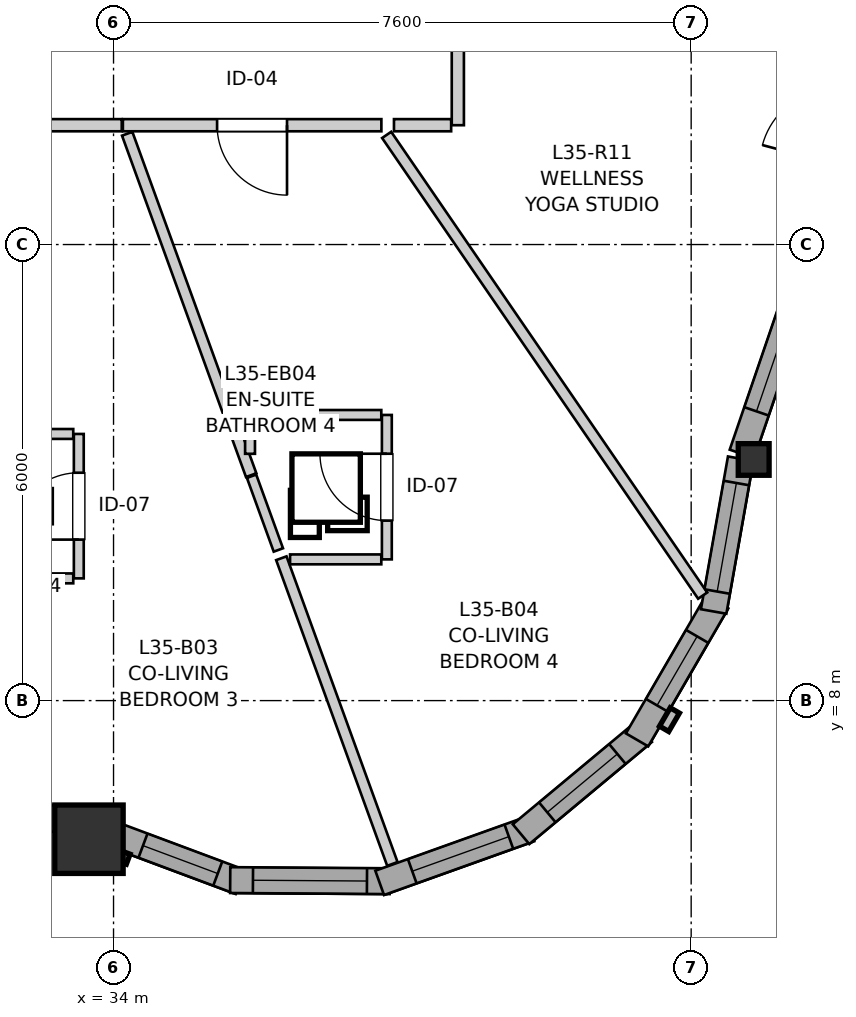
"""IFC4 building model, lengths in metres.
Left out: names, types, materials, properties, quantities, classifications, styles, units other than length and angle.
Written with IfcOpenShell. Run it as: python <this file> out.ifc"""

import sys

from ifc_helpers import new_model, si_unit, direction, frame, frame_2d, origin, origin_2d, place, context, subcontext, project, spatial, rectangle, i_section, extrude, source, transform, mapped, element, fill, save


model = new_model("IFC4")
c1 = context("Model", 3, precision=1e-05, world=origin(), true_north=direction((0.0, 1.0)))
c2 = subcontext(c1, "Body", "Model", "MODEL_VIEW")
j1 = project(units=[si_unit("LENGTHUNIT", "METRE"), si_unit("PLANEANGLEUNIT", "RADIAN")], contexts=[c1])
p1 = place(None, origin())
s1 = spatial("IfcSite", under=j1, at=p1, CompositionType="ELEMENT")
p2 = place(p1, origin())
s2 = spatial("IfcBuilding", under=s1, at=p2, CompositionType="ELEMENT")
p3 = place(p2, frame((0.0, 0.0, 118.4)))
s3 = spatial("IfcBuildingStorey", under=s2, at=p3, CompositionType="ELEMENT", Elevation=118.4)
m1 = source(origin(), c2, "Body", "SweptSolid", [
    extrude(rectangle(XDim=0.9, YDim=0.9, at=origin_2d()), origin(), (0.0, 0.0, 1.0), 2.95),
])
p4 = place(p3, frame((33.677, 6.176, 0.0), z_axis=(0.0, 0.0, 1.0), x_axis=(1.0, 0.0, 0.0)))
e1 = element("IfcColumn", 1, at=p4, inside=s3, PredefinedType="COLUMN", context=c2, shape_type="MappedRepresentation", body=[
    mapped(m1, transform((0.0, 0.0, 0.0), x_axis=(1.0, 0.0, 0.0), y_axis=(0.0, 1.0, 0.0), z_axis=(0.0, 0.0, 1.0), scale=1.0)),
])
m2 = source(origin(), c2, "Body", "SweptSolid", [
    extrude(i_section(OverallWidth=0.406, OverallDepth=0.416, WebThickness=0.027, FlangeThickness=0.044, FilletRadius=0.015, at=origin_2d()), origin(), (0.0, 0.0, 1.0), 2.95),
])
p5 = place(p3, frame((42.423, 11.172, 0.0), z_axis=(0.0, 0.0, 1.0), x_axis=(1.0, 0.0, 0.0)))
e2 = element("IfcColumn", 2, at=p5, inside=s3, PredefinedType="PILASTER", context=c2, shape_type="MappedRepresentation", body=[
    mapped(m2, transform((0.0, 0.0, 0.0), x_axis=(1.0, 0.0, 0.0), y_axis=(0.0, 1.0, 0.0), z_axis=(0.0, 0.0, 1.0), scale=1.0)),
])
p6 = place(p3, frame((30.652, 6.973, 0.0), z_axis=(0.0, 0.0, 1.0), x_axis=(0.979418300652, -0.201841007595, 0.0)))
e3 = element("IfcWall", 3, at=p6, inside=s3, PredefinedType="SOLIDWALL", context=c2, shape_type="SweptSolid", body=[
    extrude(rectangle(XDim=2.893, YDim=0.34, at=frame_2d((1.447, 0.0))), origin(), (0.0, 0.0, 1.0), 2.48),
])
p7 = place(p6, frame((0.383, 0.0, 0.82)))
e4 = element("IfcOpeningElement", 4, at=p7, cuts=e3, PredefinedType="OPENING", context=c2, shape_type="SweptSolid", body=[
    extrude(rectangle(XDim=0.58, YDim=1.35, at=frame_2d((0.29, 0.675))), frame((0.0, 0.18, 0.0), z_axis=(0.0, -1.0, 0.0), x_axis=(1.0, 0.0, 0.0)), (0.0, 0.0, 1.0), 0.36),
])
p8 = place(p6, frame((1.31, 0.0, 0.82)))
e5 = element("IfcOpeningElement", 5, at=p8, cuts=e3, PredefinedType="OPENING", context=c2, shape_type="SweptSolid", body=[
    extrude(rectangle(XDim=1.15, YDim=1.2, at=frame_2d((0.575, 0.6))), frame((0.0, 0.18, 0.0), z_axis=(0.0, -1.0, 0.0), x_axis=(1.0, 0.0, 0.0)), (0.0, 0.0, 1.0), 0.36),
])
p9 = place(p3, frame((33.952, 6.255, 0.0), z_axis=(0.0, 0.0, 1.0), x_axis=(0.936799566991, -0.349866504951, 0.0)))
e6 = element("IfcWall", 6, at=p9, inside=s3, PredefinedType="SOLIDWALL", context=c2, shape_type="SweptSolid", body=[
    extrude(rectangle(XDim=1.831, YDim=0.34, at=frame_2d((0.916, 0.0))), origin(), (0.0, 0.0, 1.0), 2.48),
])
p10 = place(p9, frame((0.466, 0.0, 0.82)))
e7 = element("IfcOpeningElement", 7, at=p10, cuts=e6, PredefinedType="OPENING", context=c2, shape_type="SweptSolid", body=[
    extrude(rectangle(XDim=1.05, YDim=1.45, at=frame_2d((0.525, 0.725))), frame((0.0, 0.18, 0.0), z_axis=(0.0, -1.0, 0.0), x_axis=(1.0, 0.0, 0.0)), (0.0, 0.0, 1.0), 0.36),
])
p11 = place(p3, frame((35.535, 5.639, 0.0), z_axis=(0.0, 0.0, 1.0), x_axis=(0.999976456891, -0.00686189939, 0.0)))
e8 = element("IfcWall", 8, at=p11, inside=s3, PredefinedType="SOLIDWALL", context=c2, shape_type="SweptSolid", body=[
    extrude(rectangle(XDim=2.099, YDim=0.34, at=frame_2d((1.05, 0.0))), origin(), (0.0, 0.0, 1.0), 2.48),
])
p12 = place(p11, frame((0.3, 0.0, 0.82)))
e9 = element("IfcOpeningElement", 9, at=p12, cuts=e8, PredefinedType="OPENING", context=c2, shape_type="SweptSolid", body=[
    extrude(rectangle(XDim=1.5, YDim=1.45, at=frame_2d((0.75, 0.725))), frame((0.0, 0.18, 0.0), z_axis=(0.0, -1.0, 0.0), x_axis=(1.0, 0.0, 0.0)), (0.0, 0.0, 1.0), 0.36),
])
p13 = place(p3, frame((37.502, 5.602, 0.0), z_axis=(0.0, 0.0, 1.0), x_axis=(0.941523304278, 0.336947870598, 0.0)))
e10 = element("IfcWall", 10, at=p13, inside=s3, PredefinedType="SOLIDWALL", context=c2, shape_type="SweptSolid", body=[
    extrude(rectangle(XDim=2.099, YDim=0.34, at=frame_2d((1.05, 0.0))), origin(), (0.0, 0.0, 1.0), 2.48),
])
p14 = place(p13, frame((0.455, 0.0, 0.82)))
e11 = element("IfcOpeningElement", 11, at=p14, cuts=e10, PredefinedType="OPENING", context=c2, shape_type="SweptSolid", body=[
    extrude(rectangle(XDim=1.35, YDim=1.45, at=frame_2d((0.675, 0.725))), frame((0.0, 0.18, 0.0), z_axis=(0.0, -1.0, 0.0), x_axis=(1.0, 0.0, 0.0)), (0.0, 0.0, 1.0), 0.36),
])
p15 = place(p3, frame((39.362, 6.242, 0.0), z_axis=(0.0, 0.0, 1.0), x_axis=(0.768440501876, 0.639921241308, 0.0)))
e12 = element("IfcWall", 12, at=p15, inside=s3, PredefinedType="SOLIDWALL", context=c2, shape_type="SweptSolid", body=[
    extrude(rectangle(XDim=2.099, YDim=0.34, at=frame_2d((1.05, 0.0))), origin(), (0.0, 0.0, 1.0), 2.48),
])
p16 = place(p15, frame((0.449, 0.0, 0.82)))
e13 = element("IfcOpeningElement", 13, at=p16, cuts=e12, PredefinedType="OPENING", context=c2, shape_type="SweptSolid", body=[
    extrude(rectangle(XDim=1.2, YDim=1.45, at=frame_2d((0.6, 0.725))), frame((0.0, 0.18, 0.0), z_axis=(0.0, -1.0, 0.0), x_axis=(1.0, 0.0, 0.0)), (0.0, 0.0, 1.0), 0.36),
])
p17 = place(p3, frame((40.888, 7.483, 0.0), z_axis=(0.0, 0.0, 1.0), x_axis=(0.501902596059, 0.864924149315, 0.0)))
e14 = element("IfcWall", 14, at=p17, inside=s3, PredefinedType="SOLIDWALL", context=c2, shape_type="SweptSolid", body=[
    extrude(rectangle(XDim=2.099, YDim=0.34, at=frame_2d((1.049, 0.0))), origin(), (0.0, 0.0, 1.0), 2.48),
])
p18 = place(p17, frame((0.524, 0.0, 0.82)))
e15 = element("IfcOpeningElement", 15, at=p18, cuts=e14, PredefinedType="OPENING", context=c2, shape_type="SweptSolid", body=[
    extrude(rectangle(XDim=1.05, YDim=1.45, at=frame_2d((0.525, 0.725))), frame((0.0, 0.18, 0.0), z_axis=(0.0, -1.0, 0.0), x_axis=(1.0, 0.0, 0.0)), (0.0, 0.0, 1.0), 0.36),
])
p19 = place(p3, frame((41.896, 9.173, 0.0), z_axis=(0.0, 0.0, 1.0), x_axis=(0.174399433509, 0.984674990843, 0.0)))
e16 = element("IfcWall", 16, at=p19, inside=s3, PredefinedType="SOLIDWALL", context=c2, shape_type="SweptSolid", body=[
    extrude(rectangle(XDim=2.041, YDim=0.34, at=frame_2d((1.021, 0.0))), origin(), (0.0, 0.0, 1.0), 2.48),
])
p20 = place(p19, frame((0.267, 0.0, 0.82)))
e17 = element("IfcOpeningElement", 17, at=p20, cuts=e16, PredefinedType="OPENING", context=c2, shape_type="SweptSolid", body=[
    extrude(rectangle(XDim=1.45, YDim=1.25, at=frame_2d((0.725, 0.625))), frame((0.0, 0.18, 0.0), z_axis=(0.0, -1.0, 0.0), x_axis=(1.0, 0.0, 0.0)), (0.0, 0.0, 1.0), 0.36),
])
p21 = place(p3, frame((42.268, 11.246, 0.0), z_axis=(0.0, 0.0, 1.0), x_axis=(0.323583674973, 0.946199558915, 0.0)))
e18 = element("IfcWall", 18, at=p21, inside=s3, PredefinedType="SOLIDWALL", context=c2, shape_type="SweptSolid", body=[
    extrude(rectangle(XDim=3.152, YDim=0.34, at=frame_2d((1.576, 0.0))), origin(), (0.0, 0.0, 1.0), 2.48),
])
p22 = place(p21, frame((0.591, 0.0, 0.82)))
e19 = element("IfcOpeningElement", 19, at=p22, cuts=e18, PredefinedType="OPENING", context=c2, shape_type="SweptSolid", body=[
    extrude(rectangle(XDim=1.95, YDim=1.4, at=frame_2d((0.975, 0.7))), frame((0.0, 0.18, 0.0), z_axis=(0.0, -1.0, 0.0), x_axis=(1.0, 0.0, 0.0)), (0.0, 0.0, 1.0), 0.36),
])
p23 = place(p3, frame((38.53, 21.321, 0.0), z_axis=(0.0, 0.0, 1.0), x_axis=(0.0, -1.0, 0.0)))
e20 = element("IfcWall", 20, at=p23, inside=s3, PredefinedType="PARTITIONING", context=c2, shape_type="SweptSolid", body=[
    extrude(rectangle(XDim=5.751, YDim=0.16, at=frame_2d((2.875, 0.0))), origin(), (0.0, 0.0, 1.0), 2.95),
])
p24 = place(p23, frame((2.404, 0.0, 0.0)))
e21 = element("IfcOpeningElement", 21, at=p24, cuts=e20, PredefinedType="OPENING", context=c2, shape_type="SweptSolid", body=[
    extrude(rectangle(XDim=0.96, YDim=2.1, at=frame_2d((0.48, 1.05))), frame((0.0, 0.09, 0.0), z_axis=(0.0, -1.0, 0.0), x_axis=(1.0, 0.0, 0.0)), (0.0, 0.0, 1.0), 0.18),
])
p25 = place(p3, frame((37.524, 15.57, 0.0), z_axis=(0.0, 0.0, 1.0), x_axis=(-1.0, 0.0, 0.0)))
e22 = element("IfcWall", 22, at=p25, inside=s3, PredefinedType="PARTITIONING", context=c2, shape_type="SweptSolid", body=[
    extrude(rectangle(XDim=3.401, YDim=0.16, at=frame_2d((1.7, 0.0))), origin(), (0.0, 0.0, 1.0), 2.95),
])
p26 = place(p25, frame((1.241, 0.0, 0.0)))
e23 = element("IfcOpeningElement", 23, at=p26, cuts=e22, PredefinedType="OPENING", context=c2, shape_type="SweptSolid", body=[
    extrude(rectangle(XDim=0.92, YDim=2.1, at=frame_2d((0.46, 1.05))), frame((0.0, 0.09, 0.0), z_axis=(0.0, -1.0, 0.0), x_axis=(1.0, 0.0, 0.0)), (0.0, 0.0, 1.0), 0.18),
])
p27 = place(p3, frame((34.108, 15.57, 0.0), z_axis=(0.0, 0.0, 1.0), x_axis=(-1.0, 0.0, 0.0)))
e24 = element("IfcWall", 24, at=p27, inside=s3, PredefinedType="PARTITIONING", context=c2, shape_type="SweptSolid", body=[
    extrude(rectangle(XDim=2.869, YDim=0.16, at=frame_2d((1.435, 0.0))), origin(), (0.0, 0.0, 1.0), 2.95),
])
p28 = place(p27, frame((0.974, 0.0, 0.0)))
e25 = element("IfcOpeningElement", 25, at=p28, cuts=e24, PredefinedType="OPENING", context=c2, shape_type="SweptSolid", body=[
    extrude(rectangle(XDim=0.92, YDim=2.1, at=frame_2d((0.46, 1.05))), frame((0.0, 0.09, 0.0), z_axis=(0.0, -1.0, 0.0), x_axis=(1.0, 0.0, 0.0)), (0.0, 0.0, 1.0), 0.18),
])
p29 = place(p3, frame((33.543, 9.608, 0.0), z_axis=(0.0, 0.0, 1.0), x_axis=(0.0, 1.0, 0.0)))
e26 = element("IfcWall", 26, at=p29, inside=s3, PredefinedType="PARTITIONING", context=c2, shape_type="SweptSolid", body=[
    extrude(rectangle(XDim=1.9, YDim=0.13, at=frame_2d((0.95, 0.0))), origin(), (0.0, 0.0, 1.0), 2.95),
])
p30 = place(p29, frame((0.51, 0.0, 0.0)))
e27 = element("IfcOpeningElement", 27, at=p30, cuts=e26, PredefinedType="OPENING", context=c2, shape_type="SweptSolid", body=[
    extrude(rectangle(XDim=0.88, YDim=2.05, at=frame_2d((0.44, 1.025))), frame((0.0, 0.075, 0.0), z_axis=(0.0, -1.0, 0.0), x_axis=(1.0, 0.0, 0.0)), (0.0, 0.0, 1.0), 0.15),
])
p31 = place(p3, frame((37.596, 9.858, 0.0), z_axis=(0.0, 0.0, 1.0), x_axis=(0.0, 1.0, 0.0)))
e28 = element("IfcWall", 28, at=p31, inside=s3, PredefinedType="PARTITIONING", context=c2, shape_type="SweptSolid", body=[
    extrude(rectangle(XDim=1.9, YDim=0.13, at=frame_2d((0.95, 0.0))), origin(), (0.0, 0.0, 1.0), 2.95),
])
p32 = place(p31, frame((0.51, 0.0, 0.0)))
e29 = element("IfcOpeningElement", 29, at=p32, cuts=e28, PredefinedType="OPENING", context=c2, shape_type="SweptSolid", body=[
    extrude(rectangle(XDim=0.88, YDim=2.05, at=frame_2d((0.44, 1.025))), frame((0.0, 0.075, 0.0), z_axis=(0.0, -1.0, 0.0), x_axis=(1.0, 0.0, 0.0)), (0.0, 0.0, 1.0), 0.15),
])
p33 = place(p3, frame((37.594, 15.442, 0.0), z_axis=(0.0, 0.0, 1.0), x_axis=(0.565681325722, -0.824623937155, 0.0)))
e30 = element("IfcWall", 30, at=p33, inside=s3, PredefinedType="PARTITIONING", context=c2, shape_type="SweptSolid", body=[
    extrude(rectangle(XDim=7.35, YDim=0.145, at=frame_2d((3.675, 0.0))), origin(), (0.0, 0.0, 1.0), 2.95),
])
p34 = place(p3, frame((34.18, 15.458, 0.0), z_axis=(0.0, 0.0, 1.0), x_axis=(0.341373856507, -0.939927598325, 0.0)))
e31 = element("IfcWall", 31, at=p34, inside=s3, PredefinedType="PARTITIONING", context=c2, shape_type="SweptSolid", body=[
    extrude(rectangle(XDim=4.779, YDim=0.145, at=frame_2d((2.389, 0.0))), origin(), (0.0, 0.0, 1.0), 2.95),
])
p35 = place(p3, frame((36.208, 9.873, 0.0), z_axis=(0.0, 0.0, 1.0), x_axis=(0.341362804218, -0.939931612351, 0.0)))
e32 = element("IfcWall", 32, at=p35, inside=s3, PredefinedType="PARTITIONING", context=c2, shape_type="SweptSolid", body=[
    extrude(rectangle(XDim=4.279, YDim=0.145, at=frame_2d((2.14, 0.0))), origin(), (0.0, 0.0, 1.0), 2.95),
])
p36 = place(p3, frame((31.743, 11.508, 0.0), z_axis=(0.0, 0.0, 1.0), x_axis=(1.0, 0.0, 0.0)))
e33 = element("IfcWall", 33, at=p36, inside=s3, PredefinedType="PARTITIONING", context=c2, shape_type="SweptSolid", body=[
    extrude(rectangle(XDim=1.727, YDim=0.13, at=frame_2d((0.864, 0.0))), origin(), (0.0, 0.0, 1.0), 2.95),
])
p37 = place(p3, frame((31.829, 9.608, 0.0), z_axis=(0.0, 0.0, 1.0), x_axis=(1.0, 0.0, 0.0)))
e34 = element("IfcWall", 34, at=p37, inside=s3, PredefinedType="PARTITIONING", context=c2, shape_type="SweptSolid", body=[
    extrude(rectangle(XDim=1.641, YDim=0.13, at=frame_2d((0.82, 0.0))), origin(), (0.0, 0.0, 1.0), 2.558),
])
p38 = place(p3, frame((35.796, 11.758, 0.0), z_axis=(0.0, 0.0, 1.0), x_axis=(1.0, 0.0, 0.0)))
e35 = element("IfcWall", 35, at=p38, inside=s3, PredefinedType="PARTITIONING", context=c2, shape_type="SweptSolid", body=[
    extrude(rectangle(XDim=1.727, YDim=0.13, at=frame_2d((0.864, 0.0))), origin(), (0.0, 0.0, 1.0), 2.95),
])
p39 = place(p3, frame((36.323, 9.858, 0.0), z_axis=(0.0, 0.0, 1.0), x_axis=(1.0, 0.0, 0.0)))
e36 = element("IfcWall", 36, at=p39, inside=s3, PredefinedType="PARTITIONING", context=c2, shape_type="SweptSolid", body=[
    extrude(rectangle(XDim=1.2, YDim=0.13, at=frame_2d((0.6, 0.0))), origin(), (0.0, 0.0, 1.0), 2.95),
])
p40 = place(p3, frame((35.816, 10.952, 0.0), z_axis=(0.0, 0.0, 1.0), x_axis=(0.341515178303, -0.939876259403, 0.0)))
e37 = element("IfcWall", 37, at=p40, inside=s3, PredefinedType="PARTITIONING", context=c2, shape_type="SweptSolid", body=[
    extrude(rectangle(XDim=1.032, YDim=0.13, at=frame_2d((0.516, 0.0))), origin(), (0.0, 0.0, 1.0), 2.95),
])
p41 = place(p3, frame((37.69, 15.57, 0.0), z_axis=(0.0, 0.0, 1.0), x_axis=(1.0, 0.0, 0.0)))
e38 = element("IfcWall", 38, at=p41, inside=s3, PredefinedType="PARTITIONING", context=c2, shape_type="SweptSolid", body=[
    extrude(rectangle(XDim=0.752, YDim=0.16, at=frame_2d((0.376, 0.0))), origin(), (0.0, 0.0, 1.0), 2.95),
])
p42 = place(p3, frame((35.796, 11.247, 0.0), z_axis=(0.0, 0.0, 1.0), x_axis=(0.0, 1.0, 0.0)))
e39 = element("IfcWall", 39, at=p42, inside=s3, PredefinedType="PARTITIONING", context=c2, shape_type="SweptSolid", body=[
    extrude(rectangle(XDim=0.438, YDim=0.13, at=frame_2d((0.219, 0.0))), origin(), (0.0, 0.0, 1.0), 2.95),
])
m3 = source(origin(), c2, "Body", "SweptSolid", [
    extrude(rectangle(XDim=1.05, YDim=1.45, at=frame_2d((0.525, 0.725))), frame((0.0, 0.03, 0.0), z_axis=(0.0, -1.0, 0.0), x_axis=(1.0, 0.0, 0.0)), (0.0, 0.0, 1.0), 0.06),
])
p43 = place(p10, origin())
e40 = element("IfcWindow", 40, at=p43, inside=s3, PartitioningType="SINGLE_PANEL", PredefinedType="WINDOW", context=c2, shape_type="MappedRepresentation", body=[
    mapped(m3, transform((0.0, 0.0, 0.0), x_axis=(1.0, 0.0, 0.0), y_axis=(0.0, 1.0, 0.0), z_axis=(0.0, 0.0, 1.0), scale=1.0)),
])
fill(e7, e40)
m4 = source(origin(), c2, "Body", "SweptSolid", [
    extrude(rectangle(XDim=1.5, YDim=1.45, at=frame_2d((0.75, 0.725))), frame((0.0, 0.03, 0.0), z_axis=(0.0, -1.0, 0.0), x_axis=(1.0, 0.0, 0.0)), (0.0, 0.0, 1.0), 0.06),
])
p44 = place(p12, origin())
e41 = element("IfcWindow", 41, at=p44, inside=s3, PartitioningType="SINGLE_PANEL", PredefinedType="WINDOW", context=c2, shape_type="MappedRepresentation", body=[
    mapped(m4, transform((0.0, 0.0, 0.0), x_axis=(1.0, 0.0, 0.0), y_axis=(0.0, 1.0, 0.0), z_axis=(0.0, 0.0, 1.0), scale=1.0)),
])
fill(e9, e41)
m5 = source(origin(), c2, "Body", "SweptSolid", [
    extrude(rectangle(XDim=1.35, YDim=1.45, at=frame_2d((0.675, 0.725))), frame((0.0, 0.03, 0.0), z_axis=(0.0, -1.0, 0.0), x_axis=(1.0, 0.0, 0.0)), (0.0, 0.0, 1.0), 0.06),
])
p45 = place(p14, origin())
e42 = element("IfcWindow", 42, at=p45, inside=s3, PartitioningType="SINGLE_PANEL", PredefinedType="WINDOW", context=c2, shape_type="MappedRepresentation", body=[
    mapped(m5, transform((0.0, 0.0, 0.0), x_axis=(1.0, 0.0, 0.0), y_axis=(0.0, 1.0, 0.0), z_axis=(0.0, 0.0, 1.0), scale=1.0)),
])
fill(e11, e42)
m6 = source(origin(), c2, "Body", "SweptSolid", [
    extrude(rectangle(XDim=1.2, YDim=1.45, at=frame_2d((0.6, 0.725))), frame((0.0, 0.03, 0.0), z_axis=(0.0, -1.0, 0.0), x_axis=(1.0, 0.0, 0.0)), (0.0, 0.0, 1.0), 0.06),
])
p46 = place(p16, origin())
e43 = element("IfcWindow", 43, at=p46, inside=s3, PartitioningType="SINGLE_PANEL", PredefinedType="WINDOW", context=c2, shape_type="MappedRepresentation", body=[
    mapped(m6, transform((0.0, 0.0, 0.0), x_axis=(1.0, 0.0, 0.0), y_axis=(0.0, 1.0, 0.0), z_axis=(0.0, 0.0, 1.0), scale=1.0)),
])
fill(e13, e43)
p47 = place(p18, origin())
e44 = element("IfcWindow", 44, at=p47, inside=s3, PartitioningType="SINGLE_PANEL", PredefinedType="WINDOW", context=c2, shape_type="MappedRepresentation", body=[
    mapped(m3, transform((0.0, 0.0, 0.0), x_axis=(1.0, 0.0, 0.0), y_axis=(0.0, 1.0, 0.0), z_axis=(0.0, 0.0, 1.0), scale=1.0)),
])
fill(e15, e44)
m7 = source(origin(), c2, "Body", "SweptSolid", [
    extrude(rectangle(XDim=1.45, YDim=1.25, at=frame_2d((0.725, 0.625))), frame((0.0, 0.03, 0.0), z_axis=(0.0, -1.0, 0.0), x_axis=(1.0, 0.0, 0.0)), (0.0, 0.0, 1.0), 0.06),
])
p48 = place(p20, origin())
e45 = element("IfcWindow", 45, at=p48, inside=s3, PartitioningType="SINGLE_PANEL", PredefinedType="WINDOW", context=c2, shape_type="MappedRepresentation", body=[
    mapped(m7, transform((0.0, 0.0, 0.0), x_axis=(1.0, 0.0, 0.0), y_axis=(0.0, 1.0, 0.0), z_axis=(0.0, 0.0, 1.0), scale=1.0)),
])
fill(e17, e45)
m8 = source(origin(), c2, "Body", "SweptSolid", [
    extrude(rectangle(XDim=1.95, YDim=1.4, at=frame_2d((0.975, 0.7))), frame((0.0, 0.03, 0.0), z_axis=(0.0, -1.0, 0.0), x_axis=(1.0, 0.0, 0.0)), (0.0, 0.0, 1.0), 0.06),
])
p49 = place(p22, origin())
e46 = element("IfcWindow", 46, at=p49, inside=s3, PartitioningType="SINGLE_PANEL", PredefinedType="WINDOW", context=c2, shape_type="MappedRepresentation", body=[
    mapped(m8, transform((0.0, 0.0, 0.0), x_axis=(1.0, 0.0, 0.0), y_axis=(0.0, 1.0, 0.0), z_axis=(0.0, 0.0, 1.0), scale=1.0)),
])
fill(e19, e46)
m9 = source(origin(), c2, "Body", "SweptSolid", [
    extrude(rectangle(XDim=0.92, YDim=2.1, at=frame_2d((0.46, 1.05))), frame((0.0, 0.025, 0.0), z_axis=(0.0, -1.0, 0.0), x_axis=(1.0, 0.0, 0.0)), (0.0, 0.0, 1.0), 0.05),
])
p50 = place(p26, origin())
e47 = element("IfcDoor", 47, at=p50, inside=s3, OperationType="SINGLE_SWING_LEFT", PredefinedType="DOOR", context=c2, shape_type="MappedRepresentation", body=[
    mapped(m9, transform((0.0, 0.0, 0.0), x_axis=(1.0, 0.0, 0.0), y_axis=(0.0, 1.0, 0.0), z_axis=(0.0, 0.0, 1.0), scale=1.0)),
])
fill(e23, e47)
m10 = source(origin(), c2, "Body", "SweptSolid", [
    extrude(rectangle(XDim=0.88, YDim=2.05, at=frame_2d((0.44, 1.025))), frame((0.0, 0.025, 0.0), z_axis=(0.0, -1.0, 0.0), x_axis=(1.0, 0.0, 0.0)), (0.0, 0.0, 1.0), 0.05),
])
p51 = place(p30, origin())
e48 = element("IfcDoor", 48, at=p51, inside=s3, OperationType="SINGLE_SWING_LEFT", PredefinedType="DOOR", context=c2, shape_type="MappedRepresentation", body=[
    mapped(m10, transform((0.0, 0.0, 0.0), x_axis=(1.0, 0.0, 0.0), y_axis=(0.0, 1.0, 0.0), z_axis=(0.0, 0.0, 1.0), scale=1.0)),
])
fill(e27, e48)
p52 = place(p32, origin())
e49 = element("IfcDoor", 49, at=p52, inside=s3, OperationType="SINGLE_SWING_RIGHT", PredefinedType="DOOR", context=c2, shape_type="MappedRepresentation", body=[
    mapped(m10, transform((0.0, 0.0, 0.0), x_axis=(1.0, 0.0, 0.0), y_axis=(0.0, 1.0, 0.0), z_axis=(0.0, 0.0, 1.0), scale=1.0)),
])
fill(e29, e49)
save(model, sys.argv[1])
